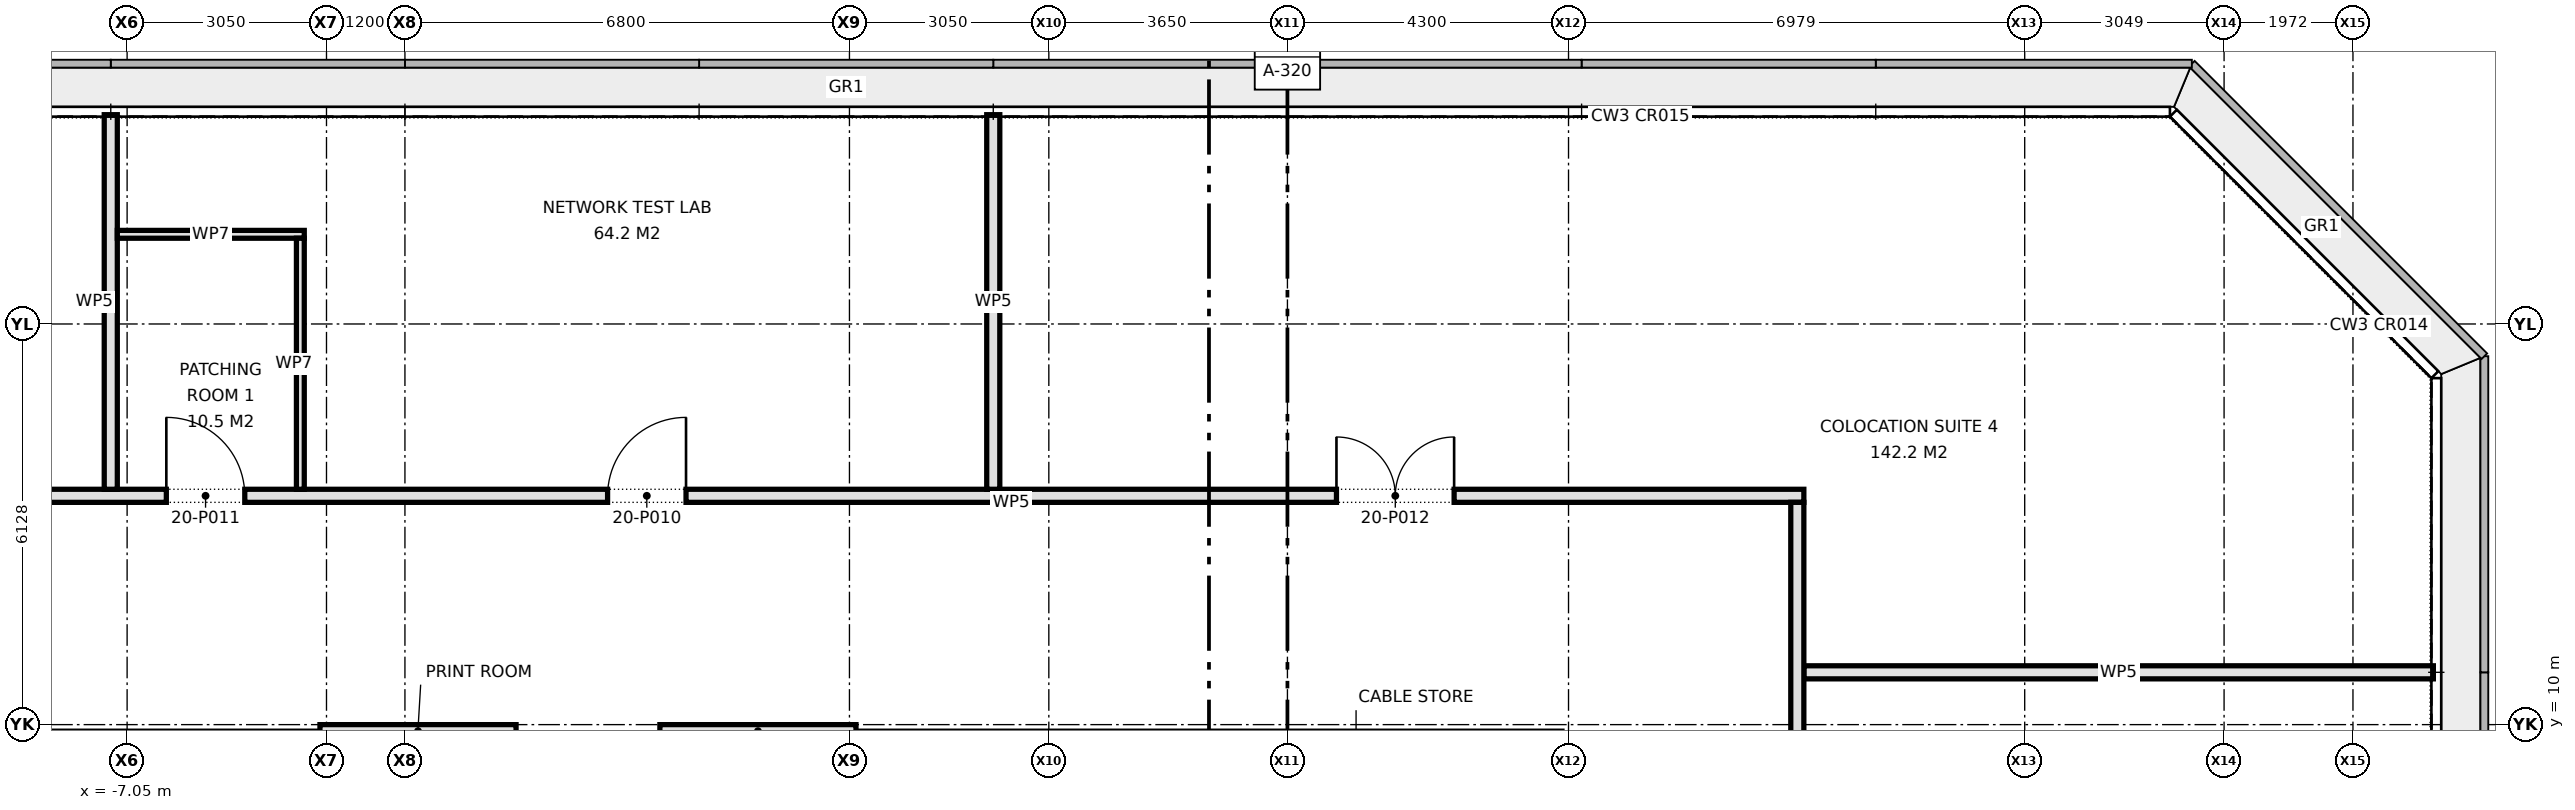
"""IFC4 building model, lengths in metres.
Left out: names, types, materials, properties, quantities, classifications, styles, units other than length and angle.
Written with IfcOpenShell. Run it as: python <this file> out.ifc"""

import sys

from ifc_helpers import new_model, si_unit, direction, frame, frame_2d, origin, place, context, subcontext, project, spatial, rectangle, extrude, element, fill, save


model = new_model("IFC4")
c1 = context("Model", 3, precision=1e-05, world=origin(), true_north=direction((0.0, 1.0)))
c2 = subcontext(c1, "Body", "Model", "MODEL_VIEW")
j1 = project(units=[si_unit("LENGTHUNIT", "METRE"), si_unit("PLANEANGLEUNIT", "RADIAN")], contexts=[c1])
p1 = place(None, origin())
s1 = spatial("IfcSite", under=j1, at=p1, CompositionType="ELEMENT")
p2 = place(p1, origin())
s2 = spatial("IfcBuilding", under=s1, at=p2, CompositionType="ELEMENT")
p3 = place(p2, frame((0.0, 0.0, 90.8)))
s3 = spatial("IfcBuildingStorey", under=s2, at=p3, CompositionType="ELEMENT", Elevation=90.8)
for number, where, z_axis, x_axis in (
    (1, (-4.1, 9.9, 0.0), (0.0, 0.0, 1.0), (1.0, 0.0, 0.0)),
    (2, (1.1, 9.9, 0.0), (0.0, 0.0, 1.0), (1.0, 0.0, 0.0)),
):
    element("IfcWall", number, at=place(p3, frame(where, z_axis=z_axis, x_axis=x_axis)), inside=s3, PredefinedType="PARTITIONING", context=c2, shape_type="SweptSolid", body=[
        extrude(rectangle(XDim=3.0, YDim=0.2, at=frame_2d((1.5, 0.0))), origin(), (0.0, 0.0, 1.0), 3.263),
    ])
p4 = place(p3, frame((18.6, 10.8, 0.0), z_axis=(0.0, 0.0, 1.0), x_axis=(1.0, 0.0, 0.0)))
e3 = element("IfcWall", 3, at=p4, inside=s3, PredefinedType="PARTITIONING", context=c2, shape_type="SweptSolid", body=[
    extrude(rectangle(XDim=9.63, YDim=0.2, at=frame_2d((4.815, 0.0))), origin(), (0.0, 0.0, 1.0), 4.2),
])
p5 = place(p3, frame((-18.6, 13.5, 0.0), z_axis=(0.0, 0.0, 1.0), x_axis=(1.0, 0.0, 0.0)))
e4 = element("IfcWall", 4, at=p5, inside=s3, PredefinedType="PARTITIONING", context=c2, shape_type="SweptSolid", body=[
    extrude(rectangle(XDim=37.2, YDim=0.2, at=frame_2d((18.6, 0.0))), origin(), (0.0, 0.0, 1.0), 4.2),
])
p6 = place(p5, frame((5.1, 0.0, 0.0)))
e5 = element("IfcOpeningElement", 5, at=p6, cuts=e4, PredefinedType="OPENING", context=c2, shape_type="SweptSolid", body=[
    extrude(rectangle(XDim=1.2, YDim=2.1, at=frame_2d((0.6, 1.05))), frame((0.0, 0.11, 0.0), z_axis=(0.0, -1.0, 0.0), x_axis=(1.0, 0.0, 0.0)), (0.0, 0.0, 1.0), 0.22),
])
p7 = place(p5, frame((18.9, 0.0, 0.0)))
e6 = element("IfcOpeningElement", 6, at=p7, cuts=e4, PredefinedType="OPENING", context=c2, shape_type="SweptSolid", body=[
    extrude(rectangle(XDim=1.2, YDim=2.1, at=frame_2d((0.6, 1.05))), frame((0.0, 0.11, 0.0), z_axis=(0.0, -1.0, 0.0), x_axis=(1.0, 0.0, 0.0)), (0.0, 0.0, 1.0), 0.22),
])
p8 = place(p5, frame((12.15, 0.0, 0.0)))
e7 = element("IfcOpeningElement", 7, at=p8, cuts=e4, PredefinedType="OPENING", context=c2, shape_type="SweptSolid", body=[
    extrude(rectangle(XDim=1.2, YDim=2.1, at=frame_2d((0.6, 1.05))), frame((0.0, 0.11, 0.0), z_axis=(0.0, -1.0, 0.0), x_axis=(1.0, 0.0, 0.0)), (0.0, 0.0, 1.0), 0.22),
])
p9 = place(p5, frame((30.05, 0.0, 0.0)))
e8 = element("IfcOpeningElement", 8, at=p9, cuts=e4, PredefinedType="OPENING", context=c2, shape_type="SweptSolid", body=[
    extrude(rectangle(XDim=1.8, YDim=2.1, at=frame_2d((0.9, 1.05))), frame((0.0, 0.11, 0.0), z_axis=(0.0, -1.0, 0.0), x_axis=(1.0, 0.0, 0.0)), (0.0, 0.0, 1.0), 0.22),
])
p10 = place(p3, frame((18.5, -13.4, 0.0), z_axis=(0.0, 0.0, 1.0), x_axis=(0.0, 1.0, 0.0)))
e9 = element("IfcWall", 9, at=p10, inside=s3, PredefinedType="PARTITIONING", context=c2, shape_type="SweptSolid", body=[
    extrude(rectangle(XDim=26.8, YDim=0.2, at=frame_2d((13.4, 0.0))), origin(), (0.0, 0.0, 1.0), 4.2),
])
p11 = place(p10, frame((5.6, 0.0, 0.0)))
e10 = element("IfcOpeningElement", 10, at=p11, cuts=e9, PredefinedType="OPENING", context=c2, shape_type="SweptSolid", body=[
    extrude(rectangle(XDim=1.2, YDim=2.1, at=frame_2d((0.6, 1.05))), frame((0.0, 0.11, 0.0), z_axis=(0.0, -1.0, 0.0), x_axis=(1.0, 0.0, 0.0)), (0.0, 0.0, 1.0), 0.22),
])
p12 = place(p10, frame((14.6, 0.0, 0.0)))
e11 = element("IfcOpeningElement", 11, at=p12, cuts=e9, PredefinedType="OPENING", context=c2, shape_type="SweptSolid", body=[
    extrude(rectangle(XDim=1.2, YDim=2.1, at=frame_2d((0.6, 1.05))), frame((0.0, 0.11, 0.0), z_axis=(0.0, -1.0, 0.0), x_axis=(1.0, 0.0, 0.0)), (0.0, 0.0, 1.0), 0.22),
])
p13 = place(p10, frame((21.05, 0.0, 0.0)))
e12 = element("IfcOpeningElement", 12, at=p13, cuts=e9, PredefinedType="OPENING", context=c2, shape_type="SweptSolid", body=[
    extrude(rectangle(XDim=1.8, YDim=2.1, at=frame_2d((0.9, 1.05))), frame((0.0, 0.11, 0.0), z_axis=(0.0, -1.0, 0.0), x_axis=(1.0, 0.0, 0.0)), (0.0, 0.0, 1.0), 0.22),
])
for number, where, z_axis, x_axis in (
    (13, (6.2, 13.6, 0.0), (0.0, 0.0, 1.0), (0.0, 1.0, 0.0)),
    (14, (-7.3, 13.6, 0.0), (0.0, 0.0, 1.0), (0.0, 1.0, 0.0)),
):
    element("IfcWall", number, at=place(p3, frame(where, z_axis=z_axis, x_axis=x_axis)), inside=s3, PredefinedType="PARTITIONING", context=c2, shape_type="SweptSolid", body=[
        extrude(rectangle(XDim=5.73, YDim=0.2, at=frame_2d((2.865, 0.0))), origin(), (0.0, 0.0, 1.0), 4.2),
    ])
p14 = place(p3, frame((-7.2, 17.5, 0.0), z_axis=(0.0, 0.0, 1.0), x_axis=(1.0, 0.0, 0.0)))
e15 = element("IfcWall", 15, at=p14, inside=s3, PredefinedType="PARTITIONING", context=c2, shape_type="SweptSolid", body=[
    extrude(rectangle(XDim=2.86, YDim=0.12, at=frame_2d((1.43, 0.0))), origin(), (0.0, 0.0, 1.0), 4.2),
])
p15 = place(p3, frame((-4.4, 13.6, 0.0), z_axis=(0.0, 0.0, 1.0), x_axis=(0.0, 1.0, 0.0)))
e16 = element("IfcWall", 16, at=p15, inside=s3, PredefinedType="PARTITIONING", context=c2, shape_type="SweptSolid", body=[
    extrude(rectangle(XDim=3.84, YDim=0.12, at=frame_2d((1.92, 0.0))), origin(), (0.0, 0.0, 1.0), 4.2),
])
p16 = place(p7, origin())
e17 = element("IfcDoor", 17, at=p16, inside=s3, OperationType="SINGLE_SWING_RIGHT", PredefinedType="DOOR", context=c2, shape_type="SweptSolid", body=[
    extrude(rectangle(XDim=1.2, YDim=2.1, at=frame_2d((0.6, 1.05))), frame((0.0, 0.025, 0.0), z_axis=(0.0, -1.0, 0.0), x_axis=(1.0, 0.0, 0.0)), (0.0, 0.0, 1.0), 0.05),
])
fill(e6, e17)
p17 = place(p8, origin())
e18 = element("IfcDoor", 18, at=p17, inside=s3, OperationType="SINGLE_SWING_LEFT", PredefinedType="DOOR", context=c2, shape_type="SweptSolid", body=[
    extrude(rectangle(XDim=1.2, YDim=2.1, at=frame_2d((0.6, 1.05))), frame((0.0, 0.025, 0.0), z_axis=(0.0, -1.0, 0.0), x_axis=(1.0, 0.0, 0.0)), (0.0, 0.0, 1.0), 0.05),
])
fill(e7, e18)
p18 = place(p9, origin())
e19 = element("IfcDoor", 19, at=p18, inside=s3, OperationType="DOUBLE_DOOR_SINGLE_SWING", PredefinedType="DOOR", context=c2, shape_type="SweptSolid", body=[
    extrude(rectangle(XDim=1.8, YDim=2.1, at=frame_2d((0.9, 1.05))), frame((0.0, 0.025, 0.0), z_axis=(0.0, -1.0, 0.0), x_axis=(1.0, 0.0, 0.0)), (0.0, 0.0, 1.0), 0.05),
])
fill(e8, e19)
save(model, sys.argv[1])
